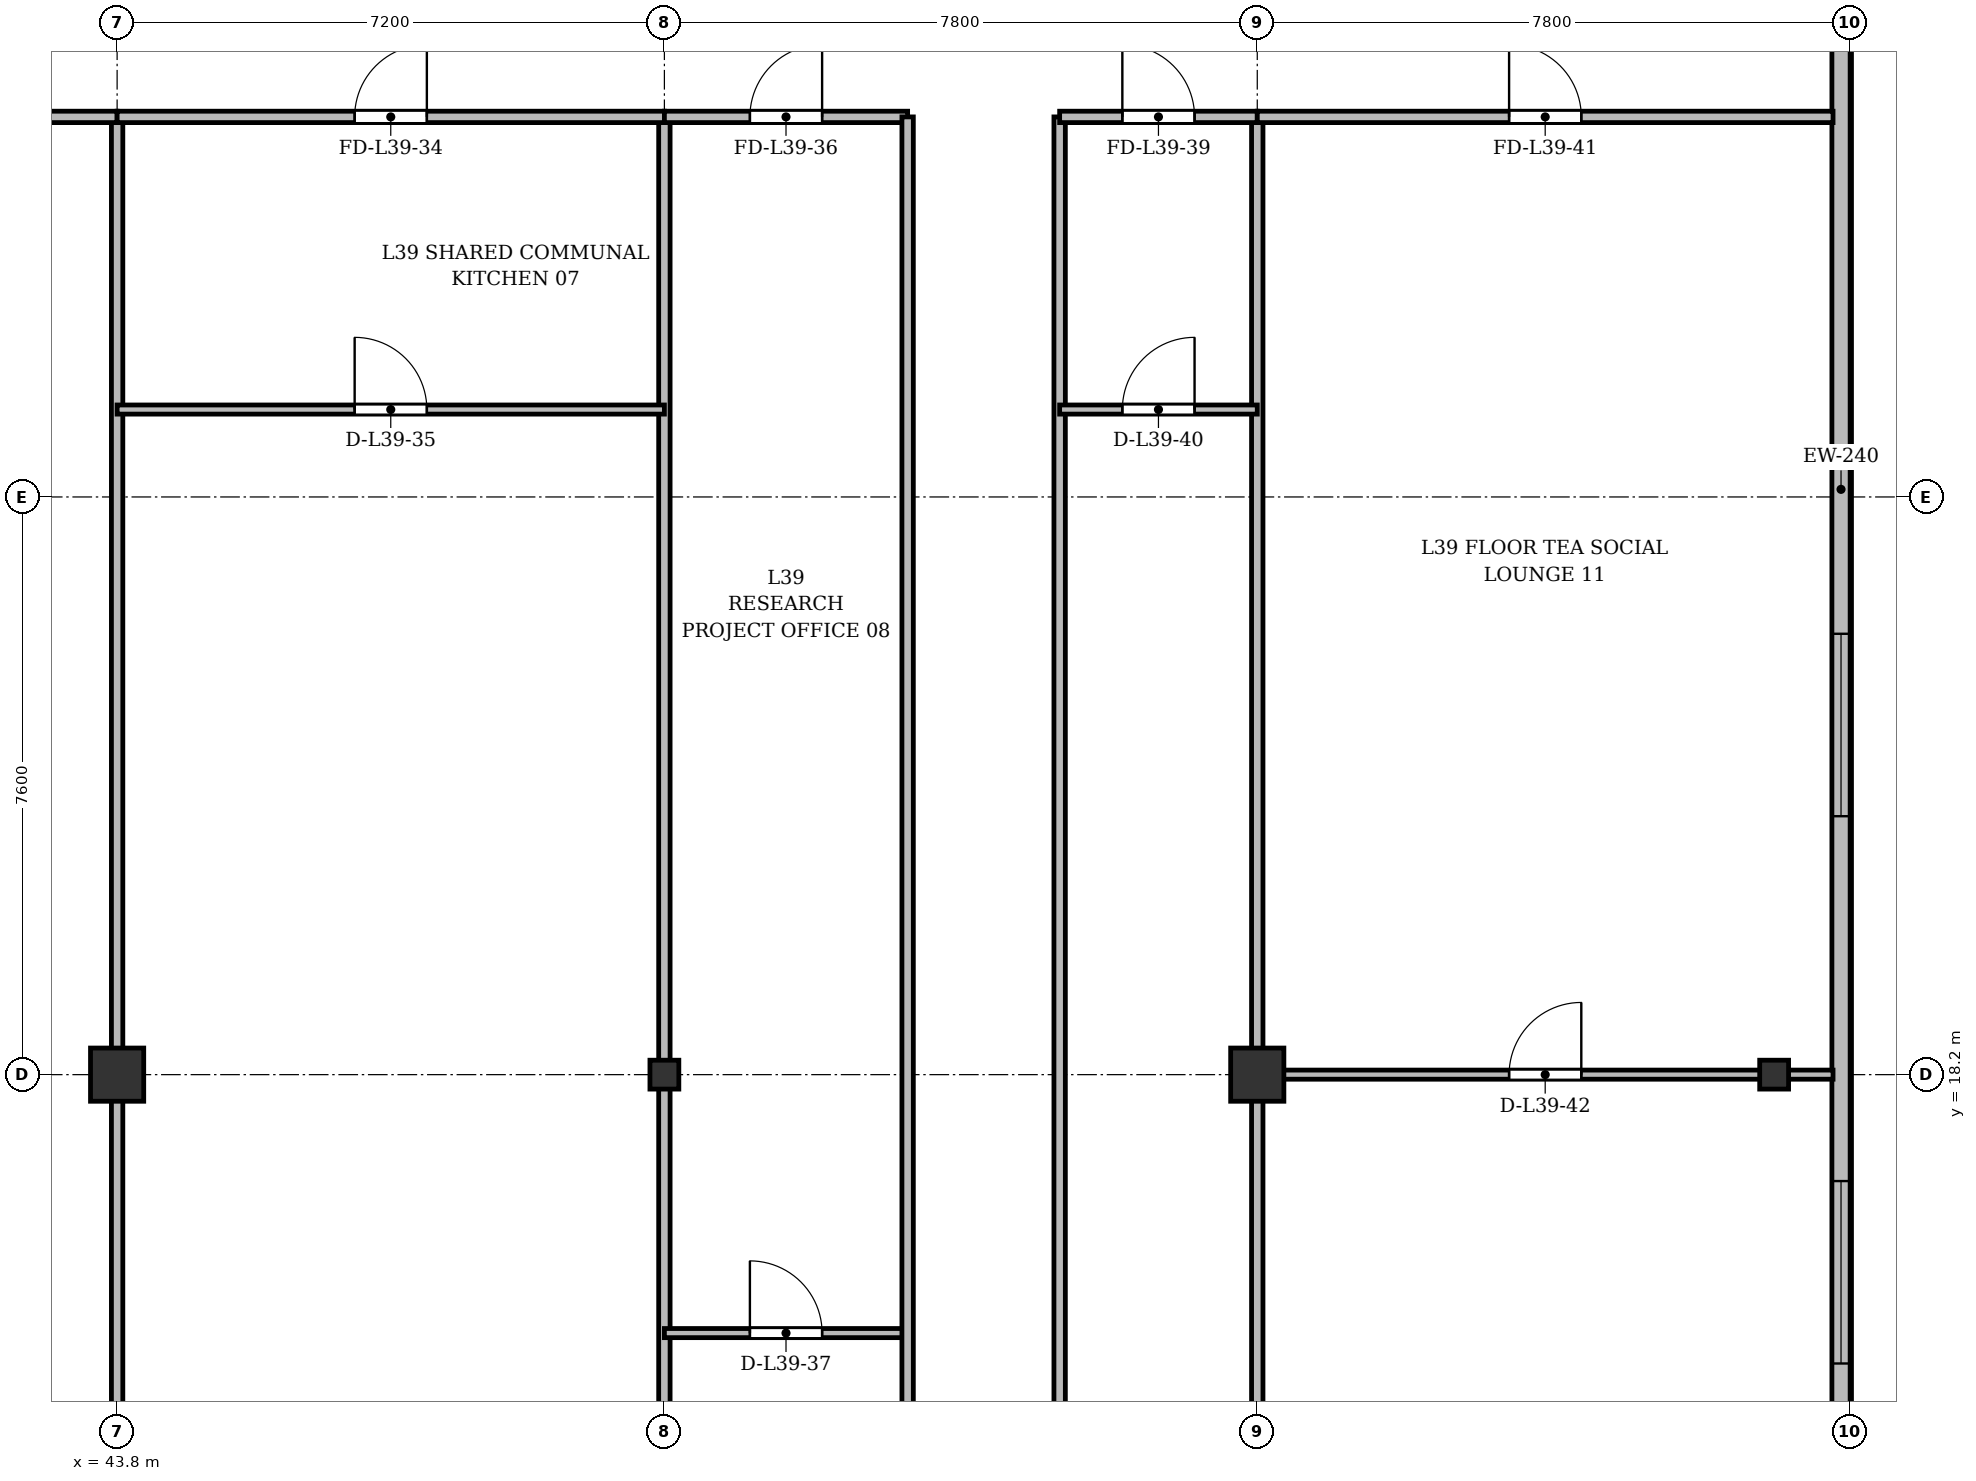
"""IFC4 building model, lengths in metres.
Left out: names, types, materials, properties, quantities, classifications, styles, units other than length and angle.
Written with IfcOpenShell. Run it as: python <this file> out.ifc"""

import sys

from ifc_helpers import new_model, si_unit, direction, frame, frame_2d, origin, origin_2d, place, context, subcontext, project, spatial, rectangle, i_section, extrude, source, transform, mapped, element, fill, save


model = new_model("IFC4")
c1 = context("Model", 3, precision=1e-05, world=origin(), true_north=direction((0.0, 1.0)))
c2 = subcontext(c1, "Body", "Model", "MODEL_VIEW")
j1 = project(units=[si_unit("LENGTHUNIT", "METRE"), si_unit("PLANEANGLEUNIT", "RADIAN")], contexts=[c1])
p1 = place(None, origin())
s1 = spatial("IfcSite", under=j1, at=p1, CompositionType="ELEMENT")
p2 = place(p1, origin())
s2 = spatial("IfcBuilding", under=s1, at=p2, CompositionType="ELEMENT")
p3 = place(p2, frame((0.0, 0.0, 150.1)))
s3 = spatial("IfcBuildingStorey", under=s2, at=p3, CompositionType="ELEMENT", Elevation=150.1)
m1 = source(origin(), c2, "Body", "SweptSolid", [
    extrude(rectangle(XDim=0.7, YDim=0.7, at=origin_2d()), origin(), (0.0, 0.0, 1.0), 3.6),
])
p4 = place(p3, frame((43.8, 18.2, 0.0), z_axis=(0.0, 0.0, 1.0), x_axis=(1.0, 0.0, 0.0)))
e1 = element("IfcColumn", 1, at=p4, inside=s3, PredefinedType="COLUMN", context=c2, shape_type="MappedRepresentation", body=[
    mapped(m1, transform((0.0, 0.0, 0.0), x_axis=(1.0, 0.0, 0.0), y_axis=(0.0, 1.0, 0.0), z_axis=(0.0, 0.0, 1.0), scale=1.0)),
])
m2 = source(origin(), c2, "Body", "SweptSolid", [
    extrude(i_section(OverallWidth=0.38, OverallDepth=0.38, WebThickness=0.02, FlangeThickness=0.03, at=origin_2d()), origin(), (0.0, 0.0, 1.0), 3.6),
])
p5 = place(p3, frame((51.0, 18.2, 0.0), z_axis=(0.0, 0.0, 1.0), x_axis=(1.0, 0.0, 0.0)))
e2 = element("IfcColumn", 2, at=p5, inside=s3, PredefinedType="COLUMN", context=c2, shape_type="MappedRepresentation", body=[
    mapped(m2, transform((0.0, 0.0, 0.0), x_axis=(1.0, 0.0, 0.0), y_axis=(0.0, 1.0, 0.0), z_axis=(0.0, 0.0, 1.0), scale=1.0)),
])
p6 = place(p3, frame((58.8, 18.2, 0.0), z_axis=(0.0, 0.0, 1.0), x_axis=(1.0, 0.0, 0.0)))
e3 = element("IfcColumn", 3, at=p6, inside=s3, PredefinedType="COLUMN", context=c2, shape_type="MappedRepresentation", body=[
    mapped(m1, transform((0.0, 0.0, 0.0), x_axis=(1.0, 0.0, 0.0), y_axis=(0.0, 1.0, 0.0), z_axis=(0.0, 0.0, 1.0), scale=1.0)),
])
p7 = place(p3, frame((65.6, 18.2, 0.0), z_axis=(0.0, 0.0, 1.0), x_axis=(1.0, 0.0, 0.0)))
e4 = element("IfcColumn", 4, at=p7, inside=s3, PredefinedType="COLUMN", context=c2, shape_type="MappedRepresentation", body=[
    mapped(m2, transform((0.0, 0.0, 0.0), x_axis=(1.0, 0.0, 0.0), y_axis=(0.0, 1.0, 0.0), z_axis=(0.0, 0.0, 1.0), scale=1.0)),
])
p8 = place(p3, frame((66.48, 45.5, 0.0), z_axis=(0.0, 0.0, 1.0), x_axis=(0.0, -1.0, 0.0)))
e5 = element("IfcWall", 5, at=p8, inside=s3, PredefinedType="SOLIDWALL", context=c2, shape_type="SweptSolid", body=[
    extrude(rectangle(XDim=39.2, YDim=0.24, at=frame_2d((19.6, 0.0))), origin(), (0.0, 0.0, 1.0), 3.35),
])
p9 = place(p8, frame((36.55, 0.0, 0.92)))
e6 = element("IfcOpeningElement", 6, at=p9, cuts=e5, PredefinedType="OPENING", context=c2, shape_type="SweptSolid", body=[
    extrude(rectangle(XDim=1.2, YDim=1.65, at=frame_2d((0.6, 0.825))), frame((0.0, 0.13, 0.0), z_axis=(0.0, -1.0, 0.0), x_axis=(1.0, 0.0, 0.0)), (0.0, 0.0, 1.0), 0.26),
])
p10 = place(p8, frame((32.9, 0.0, 0.92)))
e7 = element("IfcOpeningElement", 7, at=p10, cuts=e5, PredefinedType="OPENING", context=c2, shape_type="SweptSolid", body=[
    extrude(rectangle(XDim=2.4, YDim=2.1, at=frame_2d((1.2, 1.05))), frame((0.0, 0.13, 0.0), z_axis=(0.0, -1.0, 0.0), x_axis=(1.0, 0.0, 0.0)), (0.0, 0.0, 1.0), 0.26),
])
p11 = place(p8, frame((28.7, 0.0, 0.92)))
e8 = element("IfcOpeningElement", 8, at=p11, cuts=e5, PredefinedType="OPENING", context=c2, shape_type="SweptSolid", body=[
    extrude(rectangle(XDim=2.4, YDim=2.1, at=frame_2d((1.2, 1.05))), frame((0.0, 0.13, 0.0), z_axis=(0.0, -1.0, 0.0), x_axis=(1.0, 0.0, 0.0)), (0.0, 0.0, 1.0), 0.26),
])
p12 = place(p8, frame((21.5, 0.0, 0.92)))
e9 = element("IfcOpeningElement", 9, at=p12, cuts=e5, PredefinedType="OPENING", context=c2, shape_type="SweptSolid", body=[
    extrude(rectangle(XDim=2.4, YDim=2.1, at=frame_2d((1.2, 1.05))), frame((0.0, 0.13, 0.0), z_axis=(0.0, -1.0, 0.0), x_axis=(1.0, 0.0, 0.0)), (0.0, 0.0, 1.0), 0.26),
])
p13 = place(p8, frame((7.5, 0.0, 0.92)))
e10 = element("IfcOpeningElement", 10, at=p13, cuts=e5, PredefinedType="OPENING", context=c2, shape_type="SweptSolid", body=[
    extrude(rectangle(XDim=2.4, YDim=2.1, at=frame_2d((1.2, 1.05))), frame((0.0, 0.13, 0.0), z_axis=(0.0, -1.0, 0.0), x_axis=(1.0, 0.0, 0.0)), (0.0, 0.0, 1.0), 0.26),
])
p14 = place(p8, frame((4.5, 0.0, 0.92)))
e11 = element("IfcOpeningElement", 11, at=p14, cuts=e5, PredefinedType="OPENING", context=c2, shape_type="SweptSolid", body=[
    extrude(rectangle(XDim=1.2, YDim=1.65, at=frame_2d((0.6, 0.825))), frame((0.0, 0.13, 0.0), z_axis=(0.0, -1.0, 0.0), x_axis=(1.0, 0.0, 0.0)), (0.0, 0.0, 1.0), 0.26),
])
p15 = place(p8, frame((1.15, 0.0, 0.92)))
e12 = element("IfcOpeningElement", 12, at=p15, cuts=e5, PredefinedType="OPENING", context=c2, shape_type="SweptSolid", body=[
    extrude(rectangle(XDim=1.2, YDim=1.65, at=frame_2d((0.6, 0.825))), frame((0.0, 0.13, 0.0), z_axis=(0.0, -1.0, 0.0), x_axis=(1.0, 0.0, 0.0)), (0.0, 0.0, 1.0), 0.26),
])
for number, where, z_axis, x_axis in (
    (13, (43.8, 3.525, 0.0), (0.0, 0.0, 1.0), (0.0, 1.0, 0.0)),
    (14, (51.0, 3.525, 0.0), (0.0, 0.0, 1.0), (0.0, 1.0, 0.0)),
    (15, (58.8, 3.525, 0.0), (0.0, 0.0, 1.0), (0.0, 1.0, 0.0)),
):
    element("IfcWall", number, at=place(p3, frame(where, z_axis=z_axis, x_axis=x_axis)), inside=s3, PredefinedType="PARTITIONING", context=c2, shape_type="SweptSolid", body=[
        extrude(rectangle(XDim=27.275, YDim=0.15, at=frame_2d((13.638, 0.0))), origin(), (0.0, 0.0, 1.0), 2.85),
    ])
p16 = place(p3, frame((30.6, 30.8, 0.0), z_axis=(0.0, 0.0, 1.0), x_axis=(1.0, 0.0, 0.0)))
e16 = element("IfcWall", 16, at=p16, inside=s3, PredefinedType="PARTITIONING", context=c2, shape_type="SweptSolid", body=[
    extrude(rectangle(XDim=13.2, YDim=0.15, at=frame_2d((6.6, 0.0))), origin(), (0.0, 0.0, 1.0), 2.85),
])
p17 = place(p16, frame((5.8, 0.0, 0.0)))
e17 = element("IfcOpeningElement", 17, at=p17, cuts=e16, PredefinedType="OPENING", context=c2, shape_type="SweptSolid", body=[
    extrude(rectangle(XDim=1.6, YDim=2.2, at=frame_2d((0.8, 1.1))), frame((0.0, 0.085, 0.0), z_axis=(0.0, -1.0, 0.0), x_axis=(1.0, 0.0, 0.0)), (0.0, 0.0, 1.0), 0.17),
])
p18 = place(p3, frame((43.8, 30.8, 0.0), z_axis=(0.0, 0.0, 1.0), x_axis=(1.0, 0.0, 0.0)))
e18 = element("IfcWall", 18, at=p18, inside=s3, PredefinedType="PARTITIONING", context=c2, shape_type="SweptSolid", body=[
    extrude(rectangle(XDim=7.2, YDim=0.15, at=frame_2d((3.6, 0.0))), origin(), (0.0, 0.0, 1.0), 2.85),
])
p19 = place(p18, frame((3.125, 0.0, 0.0)))
e19 = element("IfcOpeningElement", 19, at=p19, cuts=e18, PredefinedType="OPENING", context=c2, shape_type="SweptSolid", body=[
    extrude(rectangle(XDim=0.95, YDim=2.15, at=frame_2d((0.475, 1.075))), frame((0.0, 0.085, 0.0), z_axis=(0.0, -1.0, 0.0), x_axis=(1.0, 0.0, 0.0)), (0.0, 0.0, 1.0), 0.17),
])
p20 = place(p3, frame((43.8, 26.95, 0.0), z_axis=(0.0, 0.0, 1.0), x_axis=(1.0, 0.0, 0.0)))
e20 = element("IfcWall", 20, at=p20, inside=s3, PredefinedType="PARTITIONING", context=c2, shape_type="SweptSolid", body=[
    extrude(rectangle(XDim=7.2, YDim=0.12, at=frame_2d((3.6, 0.0))), origin(), (0.0, 0.0, 1.0), 2.85),
])
p21 = place(p20, frame((3.125, 0.0, 0.0)))
e21 = element("IfcOpeningElement", 21, at=p21, cuts=e20, PredefinedType="OPENING", context=c2, shape_type="SweptSolid", body=[
    extrude(rectangle(XDim=0.95, YDim=2.15, at=frame_2d((0.475, 1.075))), frame((0.0, 0.07, 0.0), z_axis=(0.0, -1.0, 0.0), x_axis=(1.0, 0.0, 0.0)), (0.0, 0.0, 1.0), 0.14),
])
p22 = place(p3, frame((51.0, 30.8, 0.0), z_axis=(0.0, 0.0, 1.0), x_axis=(1.0, 0.0, 0.0)))
e22 = element("IfcWall", 22, at=p22, inside=s3, PredefinedType="PARTITIONING", context=c2, shape_type="SweptSolid", body=[
    extrude(rectangle(XDim=3.2, YDim=0.15, at=frame_2d((1.6, 0.0))), origin(), (0.0, 0.0, 1.0), 2.85),
])
p23 = place(p22, frame((1.125, 0.0, 0.0)))
e23 = element("IfcOpeningElement", 23, at=p23, cuts=e22, PredefinedType="OPENING", context=c2, shape_type="SweptSolid", body=[
    extrude(rectangle(XDim=0.95, YDim=2.15, at=frame_2d((0.475, 1.075))), frame((0.0, 0.085, 0.0), z_axis=(0.0, -1.0, 0.0), x_axis=(1.0, 0.0, 0.0)), (0.0, 0.0, 1.0), 0.17),
])
p24 = place(p3, frame((51.0, 14.8, 0.0), z_axis=(0.0, 0.0, 1.0), x_axis=(1.0, 0.0, 0.0)))
e24 = element("IfcWall", 24, at=p24, inside=s3, PredefinedType="PARTITIONING", context=c2, shape_type="SweptSolid", body=[
    extrude(rectangle(XDim=3.2, YDim=0.12, at=frame_2d((1.6, 0.0))), origin(), (0.0, 0.0, 1.0), 2.85),
])
p25 = place(p24, frame((1.125, 0.0, 0.0)))
e25 = element("IfcOpeningElement", 25, at=p25, cuts=e24, PredefinedType="OPENING", context=c2, shape_type="SweptSolid", body=[
    extrude(rectangle(XDim=0.95, YDim=2.15, at=frame_2d((0.475, 1.075))), frame((0.0, 0.07, 0.0), z_axis=(0.0, -1.0, 0.0), x_axis=(1.0, 0.0, 0.0)), (0.0, 0.0, 1.0), 0.14),
])
for number, where, z_axis, x_axis in (
    (26, (54.2, 3.525, 0.0), (0.0, 0.0, 1.0), (0.0, 1.0, 0.0)),
    (27, (56.2, 3.525, 0.0), (0.0, 0.0, 1.0), (0.0, 1.0, 0.0)),
):
    element("IfcWall", number, at=place(p3, frame(where, z_axis=z_axis, x_axis=x_axis)), inside=s3, PredefinedType="PARTITIONING", context=c2, shape_type="SweptSolid", body=[
        extrude(rectangle(XDim=27.275, YDim=0.15, at=frame_2d((13.638, 0.0))), origin(), (0.0, 0.0, 1.0), 2.75),
    ])
p26 = place(p3, frame((56.2, 30.8, 0.0), z_axis=(0.0, 0.0, 1.0), x_axis=(1.0, 0.0, 0.0)))
e28 = element("IfcWall", 28, at=p26, inside=s3, PredefinedType="PARTITIONING", context=c2, shape_type="SweptSolid", body=[
    extrude(rectangle(XDim=2.6, YDim=0.15, at=frame_2d((1.3, 0.0))), origin(), (0.0, 0.0, 1.0), 2.85),
])
p27 = place(p26, frame((0.825, 0.0, 0.0)))
e29 = element("IfcOpeningElement", 29, at=p27, cuts=e28, PredefinedType="OPENING", context=c2, shape_type="SweptSolid", body=[
    extrude(rectangle(XDim=0.95, YDim=2.15, at=frame_2d((0.475, 1.075))), frame((0.0, 0.085, 0.0), z_axis=(0.0, -1.0, 0.0), x_axis=(1.0, 0.0, 0.0)), (0.0, 0.0, 1.0), 0.17),
])
p28 = place(p3, frame((56.2, 26.95, 0.0), z_axis=(0.0, 0.0, 1.0), x_axis=(1.0, 0.0, 0.0)))
e30 = element("IfcWall", 30, at=p28, inside=s3, PredefinedType="PARTITIONING", context=c2, shape_type="SweptSolid", body=[
    extrude(rectangle(XDim=2.6, YDim=0.12, at=frame_2d((1.3, 0.0))), origin(), (0.0, 0.0, 1.0), 2.85),
])
p29 = place(p28, frame((0.825, 0.0, 0.0)))
e31 = element("IfcOpeningElement", 31, at=p29, cuts=e30, PredefinedType="OPENING", context=c2, shape_type="SweptSolid", body=[
    extrude(rectangle(XDim=0.95, YDim=2.15, at=frame_2d((0.475, 1.075))), frame((0.0, 0.07, 0.0), z_axis=(0.0, -1.0, 0.0), x_axis=(1.0, 0.0, 0.0)), (0.0, 0.0, 1.0), 0.14),
])
p30 = place(p3, frame((58.8, 30.8, 0.0), z_axis=(0.0, 0.0, 1.0), x_axis=(1.0, 0.0, 0.0)))
e32 = element("IfcWall", 32, at=p30, inside=s3, PredefinedType="PARTITIONING", context=c2, shape_type="SweptSolid", body=[
    extrude(rectangle(XDim=7.575, YDim=0.15, at=frame_2d((3.788, 0.0))), origin(), (0.0, 0.0, 1.0), 2.85),
])
p31 = place(p30, frame((3.313, 0.0, 0.0)))
e33 = element("IfcOpeningElement", 33, at=p31, cuts=e32, PredefinedType="OPENING", context=c2, shape_type="SweptSolid", body=[
    extrude(rectangle(XDim=0.95, YDim=2.15, at=frame_2d((0.475, 1.075))), frame((0.0, 0.085, 0.0), z_axis=(0.0, -1.0, 0.0), x_axis=(1.0, 0.0, 0.0)), (0.0, 0.0, 1.0), 0.17),
])
p32 = place(p3, frame((58.8, 18.2, 0.0), z_axis=(0.0, 0.0, 1.0), x_axis=(1.0, 0.0, 0.0)))
e34 = element("IfcWall", 34, at=p32, inside=s3, PredefinedType="PARTITIONING", context=c2, shape_type="SweptSolid", body=[
    extrude(rectangle(XDim=7.575, YDim=0.12, at=frame_2d((3.788, 0.0))), origin(), (0.0, 0.0, 1.0), 2.75),
])
p33 = place(p32, frame((3.313, 0.0, 0.0)))
e35 = element("IfcOpeningElement", 35, at=p33, cuts=e34, PredefinedType="OPENING", context=c2, shape_type="SweptSolid", body=[
    extrude(rectangle(XDim=0.95, YDim=2.15, at=frame_2d((0.475, 1.075))), frame((0.0, 0.07, 0.0), z_axis=(0.0, -1.0, 0.0), x_axis=(1.0, 0.0, 0.0)), (0.0, 0.0, 1.0), 0.14),
])
m3 = source(origin(), c2, "Body", "SweptSolid", [
    extrude(rectangle(XDim=2.4, YDim=2.1, at=frame_2d((1.2, 1.05))), frame((0.0, 0.03, 0.0), z_axis=(0.0, -1.0, 0.0), x_axis=(1.0, 0.0, 0.0)), (0.0, 0.0, 1.0), 0.06),
])
p34 = place(p11, origin())
e36 = element("IfcWindow", 36, at=p34, inside=s3, PartitioningType="SINGLE_PANEL", PredefinedType="WINDOW", context=c2, shape_type="MappedRepresentation", body=[
    mapped(m3, transform((0.0, 0.0, 0.0), x_axis=(1.0, 0.0, 0.0), y_axis=(0.0, 1.0, 0.0), z_axis=(0.0, 0.0, 1.0), scale=1.0)),
])
fill(e8, e36)
p35 = place(p12, origin())
e37 = element("IfcWindow", 37, at=p35, inside=s3, PartitioningType="SINGLE_PANEL", PredefinedType="WINDOW", context=c2, shape_type="MappedRepresentation", body=[
    mapped(m3, transform((0.0, 0.0, 0.0), x_axis=(1.0, 0.0, 0.0), y_axis=(0.0, 1.0, 0.0), z_axis=(0.0, 0.0, 1.0), scale=1.0)),
])
fill(e9, e37)
m4 = source(origin(), c2, "Body", "SweptSolid", [
    extrude(rectangle(XDim=0.95, YDim=2.15, at=frame_2d((0.475, 1.075))), frame((0.0, 0.025, 0.0), z_axis=(0.0, -1.0, 0.0), x_axis=(1.0, 0.0, 0.0)), (0.0, 0.0, 1.0), 0.05),
])
p36 = place(p19, origin())
e38 = element("IfcDoor", 38, at=p36, inside=s3, OperationType="SINGLE_SWING_RIGHT", PredefinedType="DOOR", context=c2, shape_type="MappedRepresentation", body=[
    mapped(m4, transform((0.0, 0.0, 0.0), x_axis=(1.0, 0.0, 0.0), y_axis=(0.0, 1.0, 0.0), z_axis=(0.0, 0.0, 1.0), scale=1.0)),
])
fill(e19, e38)
p37 = place(p21, origin())
e39 = element("IfcDoor", 39, at=p37, inside=s3, OperationType="SINGLE_SWING_LEFT", PredefinedType="DOOR", context=c2, shape_type="MappedRepresentation", body=[
    mapped(m4, transform((0.0, 0.0, 0.0), x_axis=(1.0, 0.0, 0.0), y_axis=(0.0, 1.0, 0.0), z_axis=(0.0, 0.0, 1.0), scale=1.0)),
])
fill(e21, e39)
p38 = place(p23, origin())
e40 = element("IfcDoor", 40, at=p38, inside=s3, OperationType="SINGLE_SWING_RIGHT", PredefinedType="DOOR", context=c2, shape_type="MappedRepresentation", body=[
    mapped(m4, transform((0.0, 0.0, 0.0), x_axis=(1.0, 0.0, 0.0), y_axis=(0.0, 1.0, 0.0), z_axis=(0.0, 0.0, 1.0), scale=1.0)),
])
fill(e23, e40)
p39 = place(p25, origin())
e41 = element("IfcDoor", 41, at=p39, inside=s3, OperationType="SINGLE_SWING_LEFT", PredefinedType="DOOR", context=c2, shape_type="MappedRepresentation", body=[
    mapped(m4, transform((0.0, 0.0, 0.0), x_axis=(1.0, 0.0, 0.0), y_axis=(0.0, 1.0, 0.0), z_axis=(0.0, 0.0, 1.0), scale=1.0)),
])
fill(e25, e41)
p40 = place(p27, origin())
e42 = element("IfcDoor", 42, at=p40, inside=s3, OperationType="SINGLE_SWING_LEFT", PredefinedType="DOOR", context=c2, shape_type="MappedRepresentation", body=[
    mapped(m4, transform((0.0, 0.0, 0.0), x_axis=(1.0, 0.0, 0.0), y_axis=(0.0, 1.0, 0.0), z_axis=(0.0, 0.0, 1.0), scale=1.0)),
])
fill(e29, e42)
p41 = place(p29, origin())
e43 = element("IfcDoor", 43, at=p41, inside=s3, OperationType="SINGLE_SWING_RIGHT", PredefinedType="DOOR", context=c2, shape_type="MappedRepresentation", body=[
    mapped(m4, transform((0.0, 0.0, 0.0), x_axis=(1.0, 0.0, 0.0), y_axis=(0.0, 1.0, 0.0), z_axis=(0.0, 0.0, 1.0), scale=1.0)),
])
fill(e31, e43)
p42 = place(p31, origin())
e44 = element("IfcDoor", 44, at=p42, inside=s3, OperationType="SINGLE_SWING_LEFT", PredefinedType="DOOR", context=c2, shape_type="MappedRepresentation", body=[
    mapped(m4, transform((0.0, 0.0, 0.0), x_axis=(1.0, 0.0, 0.0), y_axis=(0.0, 1.0, 0.0), z_axis=(0.0, 0.0, 1.0), scale=1.0)),
])
fill(e33, e44)
p43 = place(p33, origin())
e45 = element("IfcDoor", 45, at=p43, inside=s3, OperationType="SINGLE_SWING_RIGHT", PredefinedType="DOOR", context=c2, shape_type="MappedRepresentation", body=[
    mapped(m4, transform((0.0, 0.0, 0.0), x_axis=(1.0, 0.0, 0.0), y_axis=(0.0, 1.0, 0.0), z_axis=(0.0, 0.0, 1.0), scale=1.0)),
])
fill(e35, e45)
save(model, sys.argv[1])
